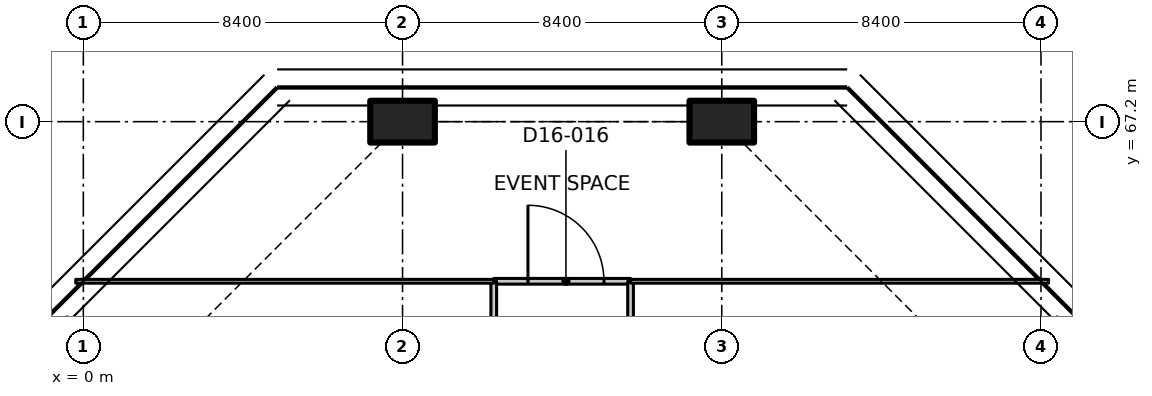
"""IFC4 building model, lengths in metres.
Left out: names, types, materials, properties, quantities, classifications, styles, units other than length and angle.
Written with IfcOpenShell. Run it as: python <this file> out.ifc"""

import sys

from ifc_helpers import new_model, si_unit, direction, frame, frame_2d, origin, origin_2d, place, context, subcontext, project, spatial, polyline, rectangle, outline, extrude, element, fill, save


model = new_model("IFC4")
c1 = context("Model", 3, precision=1e-05, world=origin(), true_north=direction((0.0, 1.0)))
c2 = subcontext(c1, "Body", "Model", "MODEL_VIEW")
j1 = project(units=[si_unit("LENGTHUNIT", "METRE"), si_unit("PLANEANGLEUNIT", "RADIAN")], contexts=[c1])
p1 = place(None, origin())
s1 = spatial("IfcSite", under=j1, at=p1, CompositionType="ELEMENT")
p2 = place(p1, origin())
s2 = spatial("IfcBuilding", under=s1, at=p2, CompositionType="ELEMENT")
p3 = place(p2, frame((0.0, 0.0, 131.3)))
s3 = spatial("IfcBuildingStorey", under=s2, at=p3, CompositionType="ELEMENT", Elevation=131.3)
for number, where, z_axis, x_axis in (
    (1, (8.4, 67.2, 0.0), (0.0, 0.0, 1.0), (0.0, 1.0, 0.0)),
    (2, (16.8, 67.2, 0.0), (0.0, 0.0, 1.0), (0.0, 1.0, 0.0)),
):
    element("IfcColumn", number, at=place(p3, frame(where, z_axis=z_axis, x_axis=x_axis)), inside=s3, PredefinedType="COLUMN", context=c2, shape_type="SweptSolid", body=[
        extrude(rectangle(XDim=1.1, YDim=1.7, at=origin_2d()), origin(), (0.0, 0.0, 1.0), 3.35),
    ])
p4 = place(p3, frame((10.8, 63.0, 0.0), z_axis=(0.0, 0.0, 1.0), x_axis=(1.0, 0.0, 0.0)))
e3 = element("IfcWall", 3, at=p4, inside=s3, PredefinedType="PARTITIONING", context=c2, shape_type="SweptSolid", body=[
    extrude(rectangle(XDim=3.6, YDim=0.15, at=frame_2d((1.8, 0.0))), origin(), (0.0, 0.0, 1.0), 3.33),
])
p5 = place(p4, frame((0.9, 0.0, 0.0)))
e4 = element("IfcOpeningElement", 4, at=p5, cuts=e3, PredefinedType="OPENING", context=c2, shape_type="SweptSolid", body=[
    extrude(rectangle(XDim=2.0, YDim=2.4, at=frame_2d((1.0, 1.2))), frame((0.0, 0.085, 0.0), z_axis=(0.0, -1.0, 0.0), x_axis=(1.0, 0.0, 0.0)), (0.0, 0.0, 1.0), 0.17),
])
p6 = place(p3, frame((10.8, 58.8, 0.0), z_axis=(0.0, 0.0, 1.0), x_axis=(0.0, 1.0, 0.0)))
e5 = element("IfcWall", 5, at=p6, inside=s3, PredefinedType="PARTITIONING", context=c2, shape_type="SweptSolid", body=[
    extrude(rectangle(XDim=4.2, YDim=0.15, at=frame_2d((2.1, 0.0))), origin(), (0.0, 0.0, 1.0), 3.33),
])
p7 = place(p6, frame((1.5, 0.0, 0.0)))
e6 = element("IfcOpeningElement", 6, at=p7, cuts=e5, PredefinedType="OPENING", context=c2, shape_type="SweptSolid", body=[
    extrude(rectangle(XDim=1.1, YDim=2.1, at=frame_2d((0.55, 1.05))), frame((0.0, 0.085, 0.0), z_axis=(0.0, -1.0, 0.0), x_axis=(1.0, 0.0, 0.0)), (0.0, 0.0, 1.0), 0.17),
])
p8 = place(p3, frame((14.4, 63.0, 0.0), z_axis=(0.0, 0.0, 1.0), x_axis=(0.0, -1.0, 0.0)))
e7 = element("IfcWall", 7, at=p8, inside=s3, PredefinedType="PARTITIONING", context=c2, shape_type="SweptSolid", body=[
    extrude(rectangle(XDim=8.4, YDim=0.15, at=frame_2d((4.2, 0.0))), origin(), (0.0, 0.0, 1.0), 3.33),
])
p9 = place(p8, frame((3.3, 0.0, 0.0)))
e8 = element("IfcOpeningElement", 8, at=p9, cuts=e7, PredefinedType="OPENING", context=c2, shape_type="SweptSolid", body=[
    extrude(rectangle(XDim=1.6, YDim=2.1, at=frame_2d((0.8, 1.05))), frame((0.0, 0.085, 0.0), z_axis=(0.0, -1.0, 0.0), x_axis=(1.0, 0.0, 0.0)), (0.0, 0.0, 1.0), 0.17),
])
p10 = place(p3, frame((10.8, 63.0, 0.0), z_axis=(0.0, 0.0, 1.0), x_axis=(-1.0, 0.0, 0.0)))
e9 = element("IfcWall", 9, at=p10, inside=s3, PredefinedType="PARTITIONING", context=c2, shape_type="SweptSolid", body=[
    extrude(outline(polyline([(0.0, 0.0), (11.0, 0.0), (11.0, 3.33), (7.266, 3.33), (7.264, 2.98), (5.936, 2.98), (5.934, 3.33), (0.0, 3.33), (0.0, 0.0)])), frame((0.0, 0.05, 0.0), z_axis=(0.0, -1.0, 0.0), x_axis=(1.0, 0.0, 0.0)), (0.0, 0.0, 1.0), 0.1),
])
p11 = place(p3, frame((25.4, 63.0, 0.0), z_axis=(0.0, 0.0, 1.0), x_axis=(-1.0, 0.0, 0.0)))
e10 = element("IfcWall", 10, at=p11, inside=s3, PredefinedType="PARTITIONING", context=c2, shape_type="SweptSolid", body=[
    extrude(outline(polyline([(0.0, 0.0), (11.0, 0.0), (11.0, 3.33), (5.066, 3.33), (5.064, 2.98), (3.736, 2.98), (3.734, 3.33), (0.0, 3.33), (0.0, 0.0)])), frame((0.0, 0.05, 0.0), z_axis=(0.0, -1.0, 0.0), x_axis=(1.0, 0.0, 0.0)), (0.0, 0.0, 1.0), 0.1),
])
p12 = place(p5, origin())
e11 = element("IfcDoor", 11, at=p12, inside=s3, OperationType="DOUBLE_DOOR_SINGLE_SWING", PredefinedType="DOOR", context=c2, shape_type="SweptSolid", body=[
    extrude(rectangle(XDim=2.0, YDim=2.4, at=frame_2d((1.0, 1.2))), frame((0.0, 0.025, 0.0), z_axis=(0.0, -1.0, 0.0), x_axis=(1.0, 0.0, 0.0)), (0.0, 0.0, 1.0), 0.05),
])
fill(e4, e11)
save(model, sys.argv[1])
